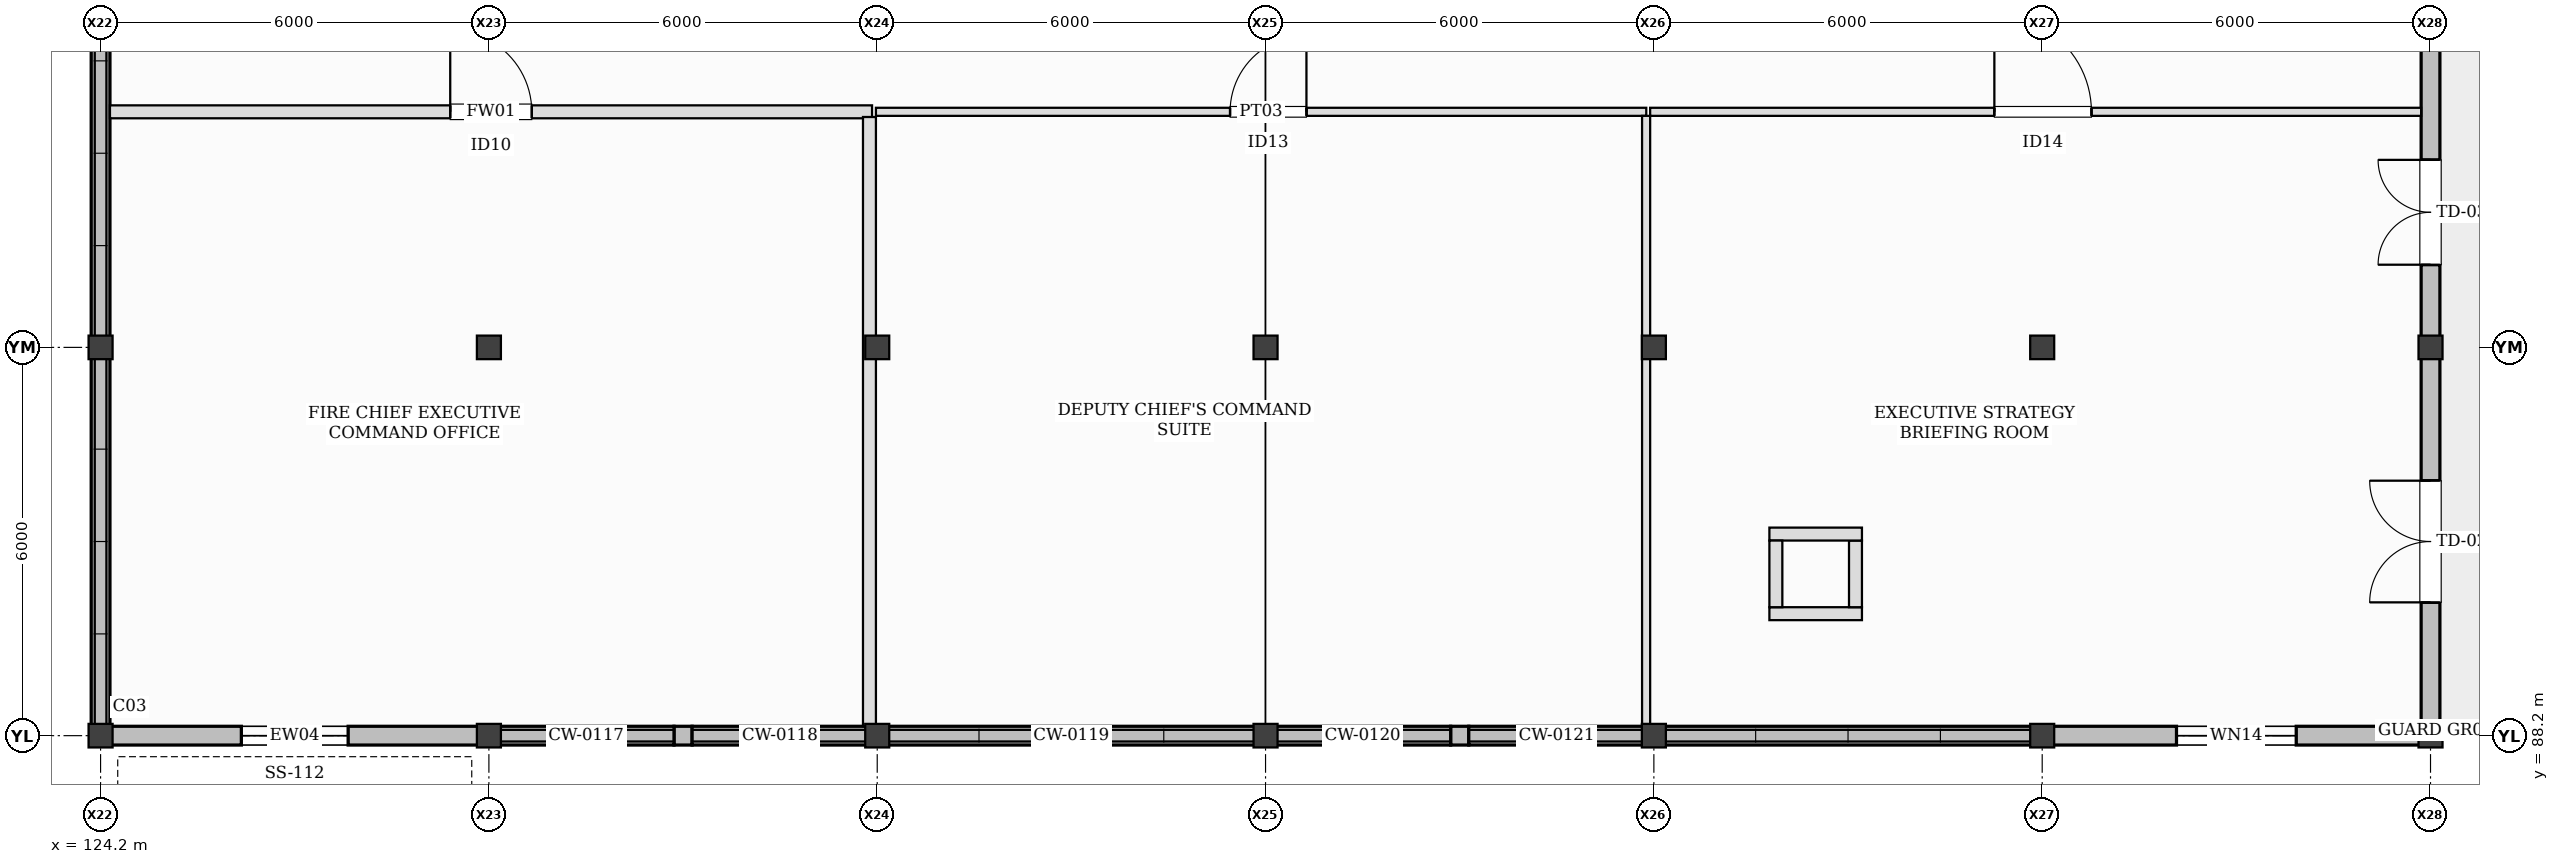
"""IFC4 building model, lengths in metres.
Left out: names, types, materials, properties, quantities, classifications, styles, units other than length and angle.
Written with IfcOpenShell. Run it as: python <this file> out.ifc"""

import sys

from ifc_helpers import new_model, si_unit, direction, frame, frame_2d, origin, origin_2d, place, context, subcontext, project, spatial, rectangle, i_section, extrude, element, fill, save


model = new_model("IFC4")
c1 = context("Model", 3, precision=1e-05, world=origin(), true_north=direction((0.0, 1.0)))
c2 = subcontext(c1, "Body", "Model", "MODEL_VIEW")
j1 = project(units=[si_unit("LENGTHUNIT", "METRE"), si_unit("PLANEANGLEUNIT", "RADIAN")], contexts=[c1])
p1 = place(None, origin())
s1 = spatial("IfcSite", under=j1, at=p1, CompositionType="ELEMENT")
p2 = place(p1, origin())
s2 = spatial("IfcBuilding", under=s1, at=p2, CompositionType="ELEMENT")
p3 = place(p2, frame((0.0, 0.0, 10.0)))
s3 = spatial("IfcBuildingStorey", under=s2, at=p3, CompositionType="ELEMENT", Elevation=10.0)
for number, where, z_axis, x_axis in (
    (1, (124.2, 88.2, 0.0), (0.0, 0.0, 1.0), (1.0, 0.0, 0.0)),
    (2, (124.2, 94.2, 0.0), (0.0, 0.0, 1.0), (1.0, 0.0, 0.0)),
    (3, (130.2, 88.2, 0.0), (0.0, 0.0, 1.0), (1.0, 0.0, 0.0)),
    (4, (130.2, 94.2, 0.0), (0.0, 0.0, 1.0), (1.0, 0.0, 0.0)),
    (5, (136.2, 88.2, 0.0), (0.0, 0.0, 1.0), (1.0, 0.0, 0.0)),
    (6, (136.2, 94.2, 0.0), (0.0, 0.0, 1.0), (1.0, 0.0, 0.0)),
    (7, (142.2, 88.2, 0.0), (0.0, 0.0, 1.0), (1.0, 0.0, 0.0)),
    (8, (142.2, 94.2, 0.0), (0.0, 0.0, 1.0), (1.0, 0.0, 0.0)),
    (9, (148.2, 88.2, 0.0), (0.0, 0.0, 1.0), (1.0, 0.0, 0.0)),
    (10, (148.2, 94.2, 0.0), (0.0, 0.0, 1.0), (1.0, 0.0, 0.0)),
    (11, (154.2, 88.2, 0.0), (0.0, 0.0, 1.0), (1.0, 0.0, 0.0)),
    (12, (154.2, 94.2, 0.0), (0.0, 0.0, 1.0), (1.0, 0.0, 0.0)),
    (13, (160.2, 88.2, 0.0), (0.0, 0.0, 1.0), (1.0, 0.0, 0.0)),
    (14, (160.2, 94.2, 0.0), (0.0, 0.0, 1.0), (1.0, 0.0, 0.0)),
):
    element("IfcColumn", number, at=place(p3, frame(where, z_axis=z_axis, x_axis=x_axis)), inside=s3, PredefinedType="COLUMN", context=c2, shape_type="SweptSolid", body=[
        extrude(i_section(OverallWidth=0.371, OverallDepth=0.364, WebThickness=0.013, FlangeThickness=0.022, at=origin_2d()), origin(), (0.0, 0.0, 1.0), 4.0),
    ])
p4 = place(p3, frame((124.345, 88.2, 0.0), z_axis=(0.0, 0.0, 1.0), x_axis=(1.0, 0.0, 0.0)))
e15 = element("IfcWall", 15, at=p4, inside=s3, PredefinedType="STANDARD", context=c2, shape_type="SweptSolid", body=[
    extrude(rectangle(XDim=5.71, YDim=0.29, at=frame_2d((2.855, 0.0))), origin(), (0.0, 0.0, 1.0), 3.249),
])
p5 = place(p4, frame((2.03, 0.0, 1.0)))
e16 = element("IfcOpeningElement", 16, at=p5, cuts=e15, PredefinedType="OPENING", context=c2, shape_type="SweptSolid", body=[
    extrude(rectangle(XDim=1.65, YDim=1.55, at=frame_2d((0.825, 0.775))), frame((0.0, 0.155, 0.0), z_axis=(0.0, -1.0, 0.0), x_axis=(1.0, 0.0, 0.0)), (0.0, 0.0, 1.0), 0.31),
])
p6 = place(p3, frame((133.06, 88.2, 0.0), z_axis=(0.0, 0.0, 1.0), x_axis=(1.0, 0.0, 0.0)))
e17 = element("IfcWall", 17, at=p6, inside=s3, PredefinedType="STANDARD", context=c2, shape_type="SweptSolid", body=[
    extrude(rectangle(XDim=0.28, YDim=0.29, at=frame_2d((0.14, 0.0))), origin(), (0.0, 0.0, 1.0), 3.249),
])
p7 = place(p3, frame((130.345, 88.2, 0.0), z_axis=(0.0, 0.0, 1.0), x_axis=(1.0, 0.0, 0.0)))
e18 = element("IfcWall", 18, at=p7, inside=s3, PredefinedType="STANDARD", context=c2, shape_type="SweptSolid", body=[
    extrude(rectangle(XDim=2.715, YDim=0.29, at=frame_2d((1.357, 0.0))), origin(), (0.0, 0.0, 1.0), 0.32),
])
p8 = place(p3, frame((133.34, 88.2, 0.0), z_axis=(0.0, 0.0, 1.0), x_axis=(1.0, 0.0, 0.0)))
e19 = element("IfcWall", 19, at=p8, inside=s3, PredefinedType="STANDARD", context=c2, shape_type="SweptSolid", body=[
    extrude(rectangle(XDim=2.715, YDim=0.29, at=frame_2d((1.357, 0.0))), origin(), (0.0, 0.0, 1.0), 0.44),
])
p9 = place(p3, frame((136.345, 88.2, 0.0), z_axis=(0.0, 0.0, 1.0), x_axis=(1.0, 0.0, 0.0)))
e20 = element("IfcWall", 20, at=p9, inside=s3, PredefinedType="STANDARD", context=c2, shape_type="SweptSolid", body=[
    extrude(rectangle(XDim=5.71, YDim=0.29, at=frame_2d((2.855, 0.0))), origin(), (0.0, 0.0, 1.0), 0.56),
])
p10 = place(p3, frame((145.06, 88.2, 0.0), z_axis=(0.0, 0.0, 1.0), x_axis=(1.0, 0.0, 0.0)))
e21 = element("IfcWall", 21, at=p10, inside=s3, PredefinedType="STANDARD", context=c2, shape_type="SweptSolid", body=[
    extrude(rectangle(XDim=0.28, YDim=0.29, at=frame_2d((0.14, 0.0))), origin(), (0.0, 0.0, 1.0), 3.249),
])
p11 = place(p3, frame((142.345, 88.2, 0.0), z_axis=(0.0, 0.0, 1.0), x_axis=(1.0, 0.0, 0.0)))
e22 = element("IfcWall", 22, at=p11, inside=s3, PredefinedType="STANDARD", context=c2, shape_type="SweptSolid", body=[
    extrude(rectangle(XDim=2.715, YDim=0.29, at=frame_2d((1.357, 0.0))), origin(), (0.0, 0.0, 1.0), 0.68),
])
p12 = place(p3, frame((145.34, 88.2, 0.0), z_axis=(0.0, 0.0, 1.0), x_axis=(1.0, 0.0, 0.0)))
e23 = element("IfcWall", 23, at=p12, inside=s3, PredefinedType="STANDARD", context=c2, shape_type="SweptSolid", body=[
    extrude(rectangle(XDim=2.715, YDim=0.29, at=frame_2d((1.357, 0.0))), origin(), (0.0, 0.0, 1.0), 0.8),
])
p13 = place(p3, frame((148.345, 88.2, 0.0), z_axis=(0.0, 0.0, 1.0), x_axis=(1.0, 0.0, 0.0)))
e24 = element("IfcWall", 24, at=p13, inside=s3, PredefinedType="STANDARD", context=c2, shape_type="SweptSolid", body=[
    extrude(rectangle(XDim=5.71, YDim=0.29, at=frame_2d((2.855, 0.0))), origin(), (0.0, 0.0, 1.0), 0.92),
])
p14 = place(p3, frame((154.345, 88.2, 0.0), z_axis=(0.0, 0.0, 1.0), x_axis=(1.0, 0.0, 0.0)))
e25 = element("IfcWall", 25, at=p14, inside=s3, PredefinedType="STANDARD", context=c2, shape_type="SweptSolid", body=[
    extrude(rectangle(XDim=5.71, YDim=0.29, at=frame_2d((2.855, 0.0))), origin(), (0.0, 0.0, 1.0), 3.299),
])
p15 = place(p14, frame((1.93, 0.0, 1.0)))
e26 = element("IfcOpeningElement", 26, at=p15, cuts=e25, PredefinedType="OPENING", context=c2, shape_type="SweptSolid", body=[
    extrude(rectangle(XDim=1.85, YDim=1.55, at=frame_2d((0.925, 0.775))), frame((0.0, 0.155, 0.0), z_axis=(0.0, -1.0, 0.0), x_axis=(1.0, 0.0, 0.0)), (0.0, 0.0, 1.0), 0.31),
])
p16 = place(p3, frame((124.2, 94.055, 0.0), z_axis=(0.0, 0.0, 1.0), x_axis=(0.0, -1.0, 0.0)))
e27 = element("IfcWall", 27, at=p16, inside=s3, PredefinedType="STANDARD", context=c2, shape_type="SweptSolid", body=[
    extrude(rectangle(XDim=5.71, YDim=0.29, at=frame_2d((2.855, 0.0))), origin(), (0.0, 0.0, 1.0), 0.92),
])
p17 = place(p3, frame((124.2, 100.055, 0.0), z_axis=(0.0, 0.0, 1.0), x_axis=(0.0, -1.0, 0.0)))
e28 = element("IfcWall", 28, at=p17, inside=s3, PredefinedType="STANDARD", context=c2, shape_type="SweptSolid", body=[
    extrude(rectangle(XDim=5.71, YDim=0.29, at=frame_2d((2.855, 0.0))), origin(), (0.0, 0.0, 1.0), 0.32),
])
p18 = place(p3, frame((160.2, 88.345, 0.0), z_axis=(0.0, 0.0, 1.0), x_axis=(0.0, 1.0, 0.0)))
e29 = element("IfcWall", 29, at=p18, inside=s3, PredefinedType="STANDARD", context=c2, shape_type="SweptSolid", body=[
    extrude(rectangle(XDim=5.71, YDim=0.29, at=frame_2d((2.855, 0.0))), origin(), (0.0, 0.0, 1.0), 3.303),
])
p19 = place(p18, frame((1.915, 0.0, 0.0)))
e30 = element("IfcOpeningElement", 30, at=p19, cuts=e29, PredefinedType="OPENING", context=c2, shape_type="SweptSolid", body=[
    extrude(rectangle(XDim=1.88, YDim=2.28, at=frame_2d((0.94, 1.14))), frame((0.0, 0.155, 0.0), z_axis=(0.0, -1.0, 0.0), x_axis=(1.0, 0.0, 0.0)), (0.0, 0.0, 1.0), 0.31),
])
p20 = place(p3, frame((160.2, 94.345, 0.0), z_axis=(0.0, 0.0, 1.0), x_axis=(0.0, 1.0, 0.0)))
e31 = element("IfcWall", 31, at=p20, inside=s3, PredefinedType="STANDARD", context=c2, shape_type="SweptSolid", body=[
    extrude(rectangle(XDim=5.71, YDim=0.29, at=frame_2d((2.855, 0.0))), origin(), (0.0, 0.0, 1.0), 3.303),
])
p21 = place(p20, frame((1.133, 0.0, 0.0)))
e32 = element("IfcOpeningElement", 32, at=p21, cuts=e31, PredefinedType="OPENING", context=c2, shape_type="SweptSolid", body=[
    extrude(rectangle(XDim=1.62, YDim=2.2, at=frame_2d((0.81, 1.1))), frame((0.0, 0.155, 0.0), z_axis=(0.0, -1.0, 0.0), x_axis=(1.0, 0.0, 0.0)), (0.0, 0.0, 1.0), 0.31),
])
p22 = place(p3, frame((149.985, 90.085, 0.0), z_axis=(0.0, 0.0, 1.0), x_axis=(1.0, 0.0, 0.0)))
e33 = element("IfcWall", 33, at=p22, inside=s3, PredefinedType="PARTITIONING", context=c2, shape_type="SweptSolid", body=[
    extrude(rectangle(XDim=1.43, YDim=0.2, at=frame_2d((0.715, 0.0))), origin(), (0.0, 0.0, 1.0), 3.74),
])
p23 = place(p3, frame((151.315, 90.185, 0.0), z_axis=(0.0, 0.0, 1.0), x_axis=(0.0, 1.0, 0.0)))
e34 = element("IfcWall", 34, at=p23, inside=s3, PredefinedType="PARTITIONING", context=c2, shape_type="SweptSolid", body=[
    extrude(rectangle(XDim=1.03, YDim=0.2, at=frame_2d((0.515, 0.0))), origin(), (0.0, 0.0, 1.0), 3.74),
])
p24 = place(p3, frame((151.415, 91.315, 0.0), z_axis=(0.0, 0.0, 1.0), x_axis=(-1.0, 0.0, 0.0)))
e35 = element("IfcWall", 35, at=p24, inside=s3, PredefinedType="PARTITIONING", context=c2, shape_type="SweptSolid", body=[
    extrude(rectangle(XDim=1.43, YDim=0.2, at=frame_2d((0.715, 0.0))), origin(), (0.0, 0.0, 1.0), 3.74),
])
p25 = place(p3, frame((150.085, 91.215, 0.0), z_axis=(0.0, 0.0, 1.0), x_axis=(0.0, -1.0, 0.0)))
e36 = element("IfcWall", 36, at=p25, inside=s3, PredefinedType="PARTITIONING", context=c2, shape_type="SweptSolid", body=[
    extrude(rectangle(XDim=1.03, YDim=0.2, at=frame_2d((0.515, 0.0))), origin(), (0.0, 0.0, 1.0), 3.45),
])
p26 = place(p3, frame((124.345, 97.84, 0.0), z_axis=(0.0, 0.0, 1.0), x_axis=(1.0, 0.0, 0.0)))
e37 = element("IfcWall", 37, at=p26, inside=s3, PredefinedType="PARTITIONING", context=c2, shape_type="SweptSolid", body=[
    extrude(rectangle(XDim=11.775, YDim=0.2, at=frame_2d((5.888, 0.0))), origin(), (0.0, 0.0, 1.0), 3.74),
])
p27 = place(p26, frame((5.258, 0.0, 0.0)))
e38 = element("IfcOpeningElement", 38, at=p27, cuts=e37, PredefinedType="OPENING", context=c2, shape_type="SweptSolid", body=[
    extrude(rectangle(XDim=1.26, YDim=2.2, at=frame_2d((0.63, 1.1))), frame((0.0, 0.11, 0.0), z_axis=(0.0, -1.0, 0.0), x_axis=(1.0, 0.0, 0.0)), (0.0, 0.0, 1.0), 0.22),
])
p28 = place(p3, frame((136.08, 97.76, 0.0), z_axis=(0.0, 0.0, 1.0), x_axis=(0.0, -1.0, 0.0)))
e39 = element("IfcWall", 39, at=p28, inside=s3, PredefinedType="PARTITIONING", context=c2, shape_type="SweptSolid", body=[
    extrude(rectangle(XDim=9.415, YDim=0.2, at=frame_2d((4.708, 0.0))), origin(), (0.0, 0.0, 1.0), 3.253),
])
p29 = place(p3, frame((136.18, 97.84, 0.0), z_axis=(0.0, 0.0, 1.0), x_axis=(1.0, 0.0, 0.0)))
e40 = element("IfcWall", 40, at=p29, inside=s3, PredefinedType="PARTITIONING", context=c2, shape_type="SweptSolid", body=[
    extrude(rectangle(XDim=11.903, YDim=0.125, at=frame_2d((5.951, 0.0))), origin(), (0.0, 0.0, 1.0), 3.74),
])
p30 = place(p29, frame((5.472, 0.0, 0.0)))
e41 = element("IfcOpeningElement", 41, at=p30, cuts=e40, PredefinedType="OPENING", context=c2, shape_type="SweptSolid", body=[
    extrude(rectangle(XDim=1.18, YDim=2.16, at=frame_2d((0.59, 1.08))), frame((0.0, 0.073, 0.0), z_axis=(0.0, -1.0, 0.0), x_axis=(1.0, 0.0, 0.0)), (0.0, 0.0, 1.0), 0.145),
])
p31 = place(p3, frame((148.08, 97.778, 0.0), z_axis=(0.0, 0.0, 1.0), x_axis=(0.0, -1.0, 0.0)))
e42 = element("IfcWall", 42, at=p31, inside=s3, PredefinedType="PARTITIONING", context=c2, shape_type="SweptSolid", body=[
    extrude(rectangle(XDim=9.433, YDim=0.125, at=frame_2d((4.716, 0.0))), origin(), (0.0, 0.0, 1.0), 3.253),
])
p32 = place(p3, frame((148.143, 97.84, 0.0), z_axis=(0.0, 0.0, 1.0), x_axis=(1.0, 0.0, 0.0)))
e43 = element("IfcWall", 43, at=p32, inside=s3, PredefinedType="PARTITIONING", context=c2, shape_type="SweptSolid", body=[
    extrude(rectangle(XDim=11.912, YDim=0.125, at=frame_2d((5.956, 0.0))), origin(), (0.0, 0.0, 1.0), 3.74),
])
p33 = place(p32, frame((5.318, 0.0, 0.0)))
e44 = element("IfcOpeningElement", 44, at=p33, cuts=e43, PredefinedType="OPENING", context=c2, shape_type="SweptSolid", body=[
    extrude(rectangle(XDim=1.5, YDim=2.22, at=frame_2d((0.75, 1.11))), frame((0.0, 0.073, 0.0), z_axis=(0.0, -1.0, 0.0), x_axis=(1.0, 0.0, 0.0)), (0.0, 0.0, 1.0), 0.145),
])
p34 = place(p5, origin())
e45 = element("IfcWindow", 45, at=p34, inside=s3, PartitioningType="SINGLE_PANEL", PredefinedType="WINDOW", context=c2, shape_type="SweptSolid", body=[
    extrude(rectangle(XDim=1.65, YDim=1.55, at=frame_2d((0.825, 0.775))), frame((0.0, 0.03, 0.0), z_axis=(0.0, -1.0, 0.0), x_axis=(1.0, 0.0, 0.0)), (0.0, 0.0, 1.0), 0.06),
])
fill(e16, e45)
p35 = place(p15, origin())
e46 = element("IfcWindow", 46, at=p35, inside=s3, PartitioningType="SINGLE_PANEL", PredefinedType="WINDOW", context=c2, shape_type="SweptSolid", body=[
    extrude(rectangle(XDim=1.85, YDim=1.55, at=frame_2d((0.925, 0.775))), frame((0.0, 0.03, 0.0), z_axis=(0.0, -1.0, 0.0), x_axis=(1.0, 0.0, 0.0)), (0.0, 0.0, 1.0), 0.06),
])
fill(e26, e46)
p36 = place(p19, frame((1.88, 0.0, 0.0), z_axis=(0.0, 0.0, 1.0), x_axis=(-1.0, 0.0, 0.0)))
e47 = element("IfcDoor", 47, at=p36, inside=s3, OperationType="DOUBLE_DOOR_SINGLE_SWING", PredefinedType="DOOR", context=c2, shape_type="SweptSolid", body=[
    extrude(rectangle(XDim=1.88, YDim=2.28, at=frame_2d((0.94, 1.14))), frame((0.0, 0.025, 0.0), z_axis=(0.0, -1.0, 0.0), x_axis=(1.0, 0.0, 0.0)), (0.0, 0.0, 1.0), 0.05),
])
fill(e30, e47)
p37 = place(p21, frame((1.62, 0.0, 0.0), z_axis=(0.0, 0.0, 1.0), x_axis=(-1.0, 0.0, 0.0)))
e48 = element("IfcDoor", 48, at=p37, inside=s3, OperationType="DOUBLE_DOOR_SINGLE_SWING", PredefinedType="DOOR", context=c2, shape_type="SweptSolid", body=[
    extrude(rectangle(XDim=1.62, YDim=2.2, at=frame_2d((0.81, 1.1))), frame((0.0, 0.025, 0.0), z_axis=(0.0, -1.0, 0.0), x_axis=(1.0, 0.0, 0.0)), (0.0, 0.0, 1.0), 0.05),
])
fill(e32, e48)
p38 = place(p27, frame((1.26, 0.0, 0.0), z_axis=(0.0, 0.0, 1.0), x_axis=(-1.0, 0.0, 0.0)))
e49 = element("IfcDoor", 49, at=p38, inside=s3, OperationType="SINGLE_SWING_LEFT", PredefinedType="DOOR", context=c2, shape_type="SweptSolid", body=[
    extrude(rectangle(XDim=1.26, YDim=2.2, at=frame_2d((0.63, 1.1))), frame((0.0, 0.025, 0.0), z_axis=(0.0, -1.0, 0.0), x_axis=(1.0, 0.0, 0.0)), (0.0, 0.0, 1.0), 0.05),
])
fill(e38, e49)
p39 = place(p30, frame((1.18, 0.0, 0.0), z_axis=(0.0, 0.0, 1.0), x_axis=(-1.0, 0.0, 0.0)))
e50 = element("IfcDoor", 50, at=p39, inside=s3, OperationType="SINGLE_SWING_RIGHT", PredefinedType="DOOR", context=c2, shape_type="SweptSolid", body=[
    extrude(rectangle(XDim=1.18, YDim=2.16, at=frame_2d((0.59, 1.08))), frame((0.0, 0.025, 0.0), z_axis=(0.0, -1.0, 0.0), x_axis=(1.0, 0.0, 0.0)), (0.0, 0.0, 1.0), 0.05),
])
fill(e41, e50)
p40 = place(p33, origin())
e51 = element("IfcDoor", 51, at=p40, inside=s3, OperationType="SINGLE_SWING_LEFT", PredefinedType="DOOR", context=c2, shape_type="SweptSolid", body=[
    extrude(rectangle(XDim=1.5, YDim=2.22, at=frame_2d((0.75, 1.11))), frame((0.0, 0.025, 0.0), z_axis=(0.0, -1.0, 0.0), x_axis=(1.0, 0.0, 0.0)), (0.0, 0.0, 1.0), 0.05),
])
fill(e44, e51)
save(model, sys.argv[1])
